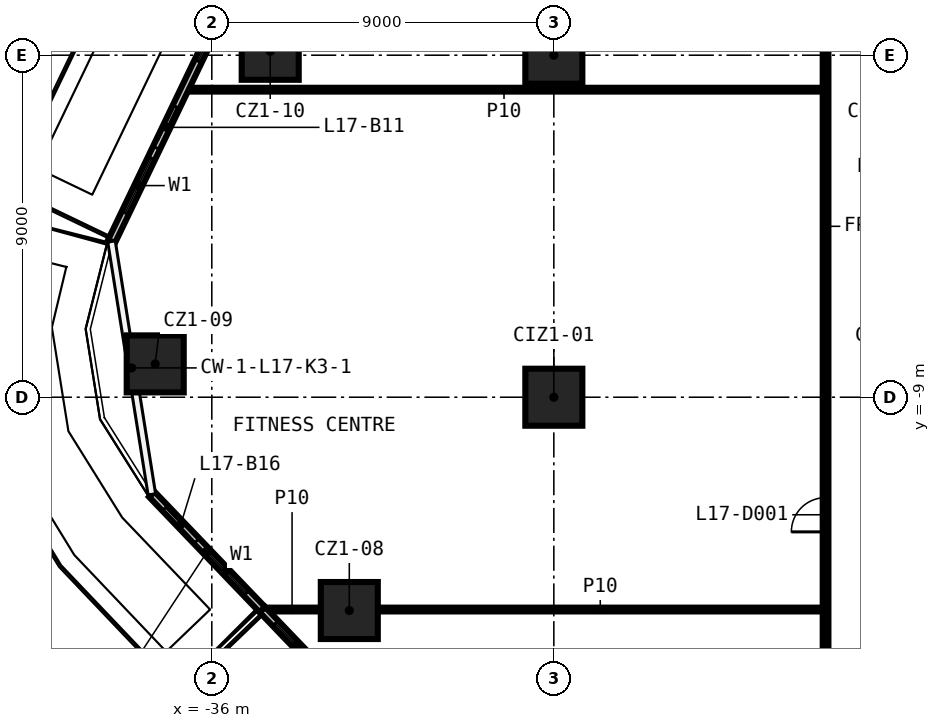
"""IFC4 building model, lengths in metres.
Left out: names, types, materials, properties, quantities, classifications, styles, units other than length and angle.
Written with IfcOpenShell. Run it as: python <this file> out.ifc"""

import sys

from ifc_helpers import new_model, si_unit, direction, frame, frame_2d, origin, origin_2d, place, context, subcontext, project, spatial, rectangle, extrude, element, fill, save


model = new_model("IFC4")
c1 = context("Model", 3, precision=1e-05, world=origin(), true_north=direction((0.0, 1.0)))
c2 = subcontext(c1, "Body", "Model", "MODEL_VIEW")
j1 = project(units=[si_unit("LENGTHUNIT", "METRE"), si_unit("PLANEANGLEUNIT", "RADIAN")], contexts=[c1])
p1 = place(None, origin())
s1 = spatial("IfcSite", under=j1, at=p1, CompositionType="ELEMENT")
p2 = place(p1, origin())
s2 = spatial("IfcBuilding", under=s1, at=p2, CompositionType="ELEMENT")
p3 = place(p2, frame((0.0, 0.0, 84.7)))
s3 = spatial("IfcBuildingStorey", under=s2, at=p3, CompositionType="ELEMENT", Elevation=84.7)
for number, where, z_axis, x_axis in (
    (1, (-32.382, -14.613, 0.0), (0.0, 0.0, 1.0), (1.0, 0.0, 0.0)),
    (2, (-37.489, -8.123, 0.0), (0.0, 0.0, 1.0), (1.0, 0.0, 0.0)),
    (3, (-34.463, 0.103, 0.0), (0.0, 0.0, 1.0), (1.0, 0.0, 0.0)),
    (4, (-27.0, -9.0, 0.0), (0.0, 0.0, 1.0), (1.0, 0.0, 0.0)),
    (5, (-27.0, 0.0, 0.0), (0.0, 0.0, 1.0), (1.0, 0.0, 0.0)),
):
    element("IfcColumn", number, at=place(p3, frame(where, z_axis=z_axis, x_axis=x_axis)), inside=s3, PredefinedType="COLUMN", context=c2, shape_type="SweptSolid", body=[
        extrude(rectangle(XDim=1.5, YDim=1.5, at=origin_2d()), origin(), (0.0, 0.0, 1.0), 3.9),
    ])
p4 = place(p3, frame((-34.644, -14.587, 0.0), z_axis=(0.0, 0.0, 1.0), x_axis=(1.0, 0.0, 0.0)))
e6 = element("IfcWall", 6, at=p4, inside=s3, PredefinedType="PARTITIONING", context=c2, shape_type="SweptSolid", body=[
    extrude(rectangle(XDim=1.512, YDim=0.1, at=frame_2d((0.756, 0.0))), origin(), (0.0, 0.0, 1.0), 3.9),
])
p5 = place(p3, frame((-31.632, -14.587, 0.0), z_axis=(0.0, 0.0, 1.0), x_axis=(1.0, 0.0, 0.0)))
e7 = element("IfcWall", 7, at=p5, inside=s3, PredefinedType="PARTITIONING", context=c2, shape_type="SweptSolid", body=[
    extrude(rectangle(XDim=11.707, YDim=0.1, at=frame_2d((5.854, 0.0))), origin(), (0.0, 0.0, 1.0), 3.9),
])
p6 = place(p3, frame((-36.698, -0.907, 0.0), z_axis=(0.0, 0.0, 1.0), x_axis=(1.0, 0.0, 0.0)))
e8 = element("IfcWall", 8, at=p6, inside=s3, PredefinedType="PARTITIONING", context=c2, shape_type="SweptSolid", body=[
    extrude(rectangle(XDim=16.772, YDim=0.1, at=frame_2d((8.386, 0.0))), origin(), (0.0, 0.0, 1.0), 3.9),
])
p7 = place(p3, frame((-19.85, -16.775, 0.0), z_axis=(0.0, 0.0, 1.0), x_axis=(0.0, 1.0, 0.0)))
e9 = element("IfcWall", 9, at=p7, inside=s3, PredefinedType="PARTITIONING", context=c2, shape_type="SweptSolid", body=[
    extrude(rectangle(XDim=33.55, YDim=0.15, at=frame_2d((16.775, 0.0))), origin(), (0.0, 0.0, 1.0), 3.9),
])
p8 = place(p7, frame((4.232, 0.0, 0.0)))
e10 = element("IfcOpeningElement", 10, at=p8, cuts=e9, PredefinedType="OPENING", context=c2, shape_type="SweptSolid", body=[
    extrude(rectangle(XDim=0.9, YDim=2.1, at=frame_2d((0.45, 1.05))), frame((0.0, 0.085, 0.0), z_axis=(0.0, -1.0, 0.0), x_axis=(1.0, 0.0, 0.0)), (0.0, 0.0, 1.0), 0.17),
])
p9 = place(p7, frame((19.413, 0.0, 0.0)))
e11 = element("IfcOpeningElement", 11, at=p9, cuts=e9, PredefinedType="OPENING", context=c2, shape_type="SweptSolid", body=[
    extrude(rectangle(XDim=0.9, YDim=2.1, at=frame_2d((0.45, 1.05))), frame((0.0, 0.085, 0.0), z_axis=(0.0, -1.0, 0.0), x_axis=(1.0, 0.0, 0.0)), (0.0, 0.0, 1.0), 0.17),
])
p10 = place(p3, frame((-25.203, 23.062, 0.0), z_axis=(0.0, 0.0, 1.0), x_axis=(-0.4330751292, -0.901357827097, 0.0)))
e12 = element("IfcWall", 12, at=p10, inside=s3, PredefinedType="SOLIDWALL", context=c2, shape_type="SweptSolid", body=[
    extrude(rectangle(XDim=31.024, YDim=0.2, at=frame_2d((15.512, 0.0))), origin(), (0.0, 0.0, 1.0), 3.9),
])
p11 = place(p10, frame((2.0, 0.0, 0.6)))
e13 = element("IfcOpeningElement", 13, at=p11, cuts=e12, PredefinedType="OPENING", context=c2, shape_type="SweptSolid", body=[
    extrude(rectangle(XDim=1.6, YDim=2.4, at=frame_2d((0.8, 1.2))), frame((0.0, 0.11, 0.0), z_axis=(0.0, -1.0, 0.0), x_axis=(1.0, 0.0, 0.0)), (0.0, 0.0, 1.0), 0.22),
])
p12 = place(p10, frame((0.5, 0.0, 0.0)))
e14 = element("IfcOpeningElement", 14, at=p12, cuts=e12, PredefinedType="OPENING", context=c2, shape_type="SweptSolid", body=[
    extrude(rectangle(XDim=1.2, YDim=2.4, at=frame_2d((0.6, 1.2))), frame((0.0, 0.11, 0.0), z_axis=(0.0, -1.0, 0.0), x_axis=(1.0, 0.0, 0.0)), (0.0, 0.0, 1.0), 0.22),
])
p13 = place(p10, frame((6.432, 0.0, 0.6)))
e15 = element("IfcOpeningElement", 15, at=p13, cuts=e12, PredefinedType="OPENING", context=c2, shape_type="SweptSolid", body=[
    extrude(rectangle(XDim=1.6, YDim=2.4, at=frame_2d((0.8, 1.2))), frame((0.0, 0.11, 0.0), z_axis=(0.0, -1.0, 0.0), x_axis=(1.0, 0.0, 0.0)), (0.0, 0.0, 1.0), 0.22),
])
p14 = place(p10, frame((4.932, 0.0, 0.0)))
e16 = element("IfcOpeningElement", 16, at=p14, cuts=e12, PredefinedType="OPENING", context=c2, shape_type="SweptSolid", body=[
    extrude(rectangle(XDim=1.2, YDim=2.4, at=frame_2d((0.6, 1.2))), frame((0.0, 0.11, 0.0), z_axis=(0.0, -1.0, 0.0), x_axis=(1.0, 0.0, 0.0)), (0.0, 0.0, 1.0), 0.22),
])
p15 = place(p10, frame((10.864, 0.0, 0.6)))
e17 = element("IfcOpeningElement", 17, at=p15, cuts=e12, PredefinedType="OPENING", context=c2, shape_type="SweptSolid", body=[
    extrude(rectangle(XDim=1.6, YDim=2.4, at=frame_2d((0.8, 1.2))), frame((0.0, 0.11, 0.0), z_axis=(0.0, -1.0, 0.0), x_axis=(1.0, 0.0, 0.0)), (0.0, 0.0, 1.0), 0.22),
])
p16 = place(p10, frame((9.364, 0.0, 0.0)))
e18 = element("IfcOpeningElement", 18, at=p16, cuts=e12, PredefinedType="OPENING", context=c2, shape_type="SweptSolid", body=[
    extrude(rectangle(XDim=1.2, YDim=2.4, at=frame_2d((0.6, 1.2))), frame((0.0, 0.11, 0.0), z_axis=(0.0, -1.0, 0.0), x_axis=(1.0, 0.0, 0.0)), (0.0, 0.0, 1.0), 0.22),
])
p17 = place(p10, frame((15.296, 0.0, 0.6)))
e19 = element("IfcOpeningElement", 19, at=p17, cuts=e12, PredefinedType="OPENING", context=c2, shape_type="SweptSolid", body=[
    extrude(rectangle(XDim=1.6, YDim=2.4, at=frame_2d((0.8, 1.2))), frame((0.0, 0.11, 0.0), z_axis=(0.0, -1.0, 0.0), x_axis=(1.0, 0.0, 0.0)), (0.0, 0.0, 1.0), 0.22),
])
p18 = place(p10, frame((13.796, 0.0, 0.0)))
e20 = element("IfcOpeningElement", 20, at=p18, cuts=e12, PredefinedType="OPENING", context=c2, shape_type="SweptSolid", body=[
    extrude(rectangle(XDim=1.2, YDim=2.4, at=frame_2d((0.6, 1.2))), frame((0.0, 0.11, 0.0), z_axis=(0.0, -1.0, 0.0), x_axis=(1.0, 0.0, 0.0)), (0.0, 0.0, 1.0), 0.22),
])
p19 = place(p10, frame((19.728, 0.0, 0.6)))
e21 = element("IfcOpeningElement", 21, at=p19, cuts=e12, PredefinedType="OPENING", context=c2, shape_type="SweptSolid", body=[
    extrude(rectangle(XDim=1.6, YDim=2.4, at=frame_2d((0.8, 1.2))), frame((0.0, 0.11, 0.0), z_axis=(0.0, -1.0, 0.0), x_axis=(1.0, 0.0, 0.0)), (0.0, 0.0, 1.0), 0.22),
])
p20 = place(p10, frame((18.228, 0.0, 0.0)))
e22 = element("IfcOpeningElement", 22, at=p20, cuts=e12, PredefinedType="OPENING", context=c2, shape_type="SweptSolid", body=[
    extrude(rectangle(XDim=1.2, YDim=2.4, at=frame_2d((0.6, 1.2))), frame((0.0, 0.11, 0.0), z_axis=(0.0, -1.0, 0.0), x_axis=(1.0, 0.0, 0.0)), (0.0, 0.0, 1.0), 0.22),
])
p21 = place(p10, frame((24.16, 0.0, 0.6)))
e23 = element("IfcOpeningElement", 23, at=p21, cuts=e12, PredefinedType="OPENING", context=c2, shape_type="SweptSolid", body=[
    extrude(rectangle(XDim=1.6, YDim=2.4, at=frame_2d((0.8, 1.2))), frame((0.0, 0.11, 0.0), z_axis=(0.0, -1.0, 0.0), x_axis=(1.0, 0.0, 0.0)), (0.0, 0.0, 1.0), 0.22),
])
p22 = place(p10, frame((22.66, 0.0, 0.0)))
e24 = element("IfcOpeningElement", 24, at=p22, cuts=e12, PredefinedType="OPENING", context=c2, shape_type="SweptSolid", body=[
    extrude(rectangle(XDim=1.2, YDim=2.4, at=frame_2d((0.6, 1.2))), frame((0.0, 0.11, 0.0), z_axis=(0.0, -1.0, 0.0), x_axis=(1.0, 0.0, 0.0)), (0.0, 0.0, 1.0), 0.22),
])
p23 = place(p10, frame((28.592, 0.0, 0.6)))
e25 = element("IfcOpeningElement", 25, at=p23, cuts=e12, PredefinedType="OPENING", context=c2, shape_type="SweptSolid", body=[
    extrude(rectangle(XDim=1.6, YDim=2.4, at=frame_2d((0.8, 1.2))), frame((0.0, 0.11, 0.0), z_axis=(0.0, -1.0, 0.0), x_axis=(1.0, 0.0, 0.0)), (0.0, 0.0, 1.0), 0.22),
])
p24 = place(p10, frame((27.092, 0.0, 0.0)))
e26 = element("IfcOpeningElement", 26, at=p24, cuts=e12, PredefinedType="OPENING", context=c2, shape_type="SweptSolid", body=[
    extrude(rectangle(XDim=1.2, YDim=2.4, at=frame_2d((0.6, 1.2))), frame((0.0, 0.11, 0.0), z_axis=(0.0, -1.0, 0.0), x_axis=(1.0, 0.0, 0.0)), (0.0, 0.0, 1.0), 0.22),
])
p25 = place(p3, frame((-34.672, -14.587, 0.0), z_axis=(0.0, 0.0, 1.0), x_axis=(0.691990084897, -0.721907003987, 0.0)))
e27 = element("IfcWall", 27, at=p25, inside=s3, PredefinedType="SOLIDWALL", context=c2, shape_type="SweptSolid", body=[
    extrude(rectangle(XDim=16.835, YDim=0.2, at=frame_2d((8.418, 0.0))), origin(), (0.0, 0.0, 1.0), 3.9),
])
p26 = place(p25, frame((0.5, 0.0, 0.6)))
e28 = element("IfcOpeningElement", 28, at=p26, cuts=e27, PredefinedType="OPENING", context=c2, shape_type="SweptSolid", body=[
    extrude(rectangle(XDim=1.6, YDim=2.4, at=frame_2d((0.8, 1.2))), frame((0.0, 0.11, 0.0), z_axis=(0.0, -1.0, 0.0), x_axis=(1.0, 0.0, 0.0)), (0.0, 0.0, 1.0), 0.22),
])
p27 = place(p25, frame((2.5, 0.0, 0.0)))
e29 = element("IfcOpeningElement", 29, at=p27, cuts=e27, PredefinedType="OPENING", context=c2, shape_type="SweptSolid", body=[
    extrude(rectangle(XDim=1.2, YDim=2.4, at=frame_2d((0.6, 1.2))), frame((0.0, 0.11, 0.0), z_axis=(0.0, -1.0, 0.0), x_axis=(1.0, 0.0, 0.0)), (0.0, 0.0, 1.0), 0.22),
])
p28 = place(p25, frame((6.209, 0.0, 0.6)))
e30 = element("IfcOpeningElement", 30, at=p28, cuts=e27, PredefinedType="OPENING", context=c2, shape_type="SweptSolid", body=[
    extrude(rectangle(XDim=1.6, YDim=2.4, at=frame_2d((0.8, 1.2))), frame((0.0, 0.11, 0.0), z_axis=(0.0, -1.0, 0.0), x_axis=(1.0, 0.0, 0.0)), (0.0, 0.0, 1.0), 0.22),
])
p29 = place(p25, frame((4.709, 0.0, 0.0)))
e31 = element("IfcOpeningElement", 31, at=p29, cuts=e27, PredefinedType="OPENING", context=c2, shape_type="SweptSolid", body=[
    extrude(rectangle(XDim=1.2, YDim=2.4, at=frame_2d((0.6, 1.2))), frame((0.0, 0.11, 0.0), z_axis=(0.0, -1.0, 0.0), x_axis=(1.0, 0.0, 0.0)), (0.0, 0.0, 1.0), 0.22),
])
p30 = place(p25, frame((8.918, 0.0, 0.6)))
e32 = element("IfcOpeningElement", 32, at=p30, cuts=e27, PredefinedType="OPENING", context=c2, shape_type="SweptSolid", body=[
    extrude(rectangle(XDim=1.6, YDim=2.4, at=frame_2d((0.8, 1.2))), frame((0.0, 0.11, 0.0), z_axis=(0.0, -1.0, 0.0), x_axis=(1.0, 0.0, 0.0)), (0.0, 0.0, 1.0), 0.22),
])
p31 = place(p25, frame((10.818, 0.0, 0.0)))
e33 = element("IfcOpeningElement", 33, at=p31, cuts=e27, PredefinedType="OPENING", context=c2, shape_type="SweptSolid", body=[
    extrude(rectangle(XDim=1.2, YDim=2.4, at=frame_2d((0.6, 1.2))), frame((0.0, 0.11, 0.0), z_axis=(0.0, -1.0, 0.0), x_axis=(1.0, 0.0, 0.0)), (0.0, 0.0, 1.0), 0.22),
])
p32 = place(p25, frame((14.626, 0.0, 0.6)))
e34 = element("IfcOpeningElement", 34, at=p32, cuts=e27, PredefinedType="OPENING", context=c2, shape_type="SweptSolid", body=[
    extrude(rectangle(XDim=1.6, YDim=2.4, at=frame_2d((0.8, 1.2))), frame((0.0, 0.11, 0.0), z_axis=(0.0, -1.0, 0.0), x_axis=(1.0, 0.0, 0.0)), (0.0, 0.0, 1.0), 0.22),
])
p33 = place(p25, frame((13.126, 0.0, 0.0)))
e35 = element("IfcOpeningElement", 35, at=p33, cuts=e27, PredefinedType="OPENING", context=c2, shape_type="SweptSolid", body=[
    extrude(rectangle(XDim=1.2, YDim=2.4, at=frame_2d((0.6, 1.2))), frame((0.0, 0.11, 0.0), z_axis=(0.0, -1.0, 0.0), x_axis=(1.0, 0.0, 0.0)), (0.0, 0.0, 1.0), 0.22),
])
p34 = place(p3, frame((-37.578, -11.556, 0.0), z_axis=(0.0, 0.0, 1.0), x_axis=(0.692005127075, -0.721892584878, 0.0)))
e36 = element("IfcWall", 36, at=p34, inside=s3, PredefinedType="SOLIDWALL", context=c2, shape_type="SweptSolid", body=[
    extrude(rectangle(XDim=4.199, YDim=0.2, at=frame_2d((2.099, 0.0))), origin(), (0.0, 0.0, 1.0), 3.9),
])
p35 = place(p34, frame((2.0, 0.0, 0.6)))
e37 = element("IfcOpeningElement", 37, at=p35, cuts=e36, PredefinedType="OPENING", context=c2, shape_type="SweptSolid", body=[
    extrude(rectangle(XDim=1.6, YDim=2.4, at=frame_2d((0.8, 1.2))), frame((0.0, 0.11, 0.0), z_axis=(0.0, -1.0, 0.0), x_axis=(1.0, 0.0, 0.0)), (0.0, 0.0, 1.0), 0.22),
])
p36 = place(p34, frame((0.5, 0.0, 0.0)))
e38 = element("IfcOpeningElement", 38, at=p36, cuts=e36, PredefinedType="OPENING", context=c2, shape_type="SweptSolid", body=[
    extrude(rectangle(XDim=1.2, YDim=2.4, at=frame_2d((0.6, 1.2))), frame((0.0, 0.11, 0.0), z_axis=(0.0, -1.0, 0.0), x_axis=(1.0, 0.0, 0.0)), (0.0, 0.0, 1.0), 0.22),
])
p37 = place(p8, origin())
e39 = element("IfcDoor", 39, at=p37, inside=s3, OperationType="SINGLE_SWING_RIGHT", PredefinedType="DOOR", context=c2, shape_type="SweptSolid", body=[
    extrude(rectangle(XDim=0.9, YDim=2.1, at=frame_2d((0.45, 1.05))), frame((0.0, 0.025, 0.0), z_axis=(0.0, -1.0, 0.0), x_axis=(1.0, 0.0, 0.0)), (0.0, 0.0, 1.0), 0.05),
])
fill(e10, e39)
p38 = place(p21, origin())
e40 = element("IfcWindow", 40, at=p38, inside=s3, PartitioningType="SINGLE_PANEL", PredefinedType="WINDOW", context=c2, shape_type="SweptSolid", body=[
    extrude(rectangle(XDim=1.6, YDim=2.4, at=frame_2d((0.8, 1.2))), frame((0.0, 0.03, 0.0), z_axis=(0.0, -1.0, 0.0), x_axis=(1.0, 0.0, 0.0)), (0.0, 0.0, 1.0), 0.06),
])
fill(e23, e40)
p39 = place(p23, origin())
e41 = element("IfcWindow", 41, at=p39, inside=s3, PartitioningType="SINGLE_PANEL", PredefinedType="WINDOW", context=c2, shape_type="SweptSolid", body=[
    extrude(rectangle(XDim=1.6, YDim=2.4, at=frame_2d((0.8, 1.2))), frame((0.0, 0.03, 0.0), z_axis=(0.0, -1.0, 0.0), x_axis=(1.0, 0.0, 0.0)), (0.0, 0.0, 1.0), 0.06),
])
fill(e25, e41)
p40 = place(p24, origin())
e42 = element("IfcDoor", 42, at=p40, inside=s3, OperationType="SLIDING_TO_LEFT", PredefinedType="DOOR", context=c2, shape_type="SweptSolid", body=[
    extrude(rectangle(XDim=1.2, YDim=2.4, at=frame_2d((0.6, 1.2))), frame((0.0, 0.025, 0.0), z_axis=(0.0, -1.0, 0.0), x_axis=(1.0, 0.0, 0.0)), (0.0, 0.0, 1.0), 0.05),
])
fill(e26, e42)
p41 = place(p26, origin())
e43 = element("IfcWindow", 43, at=p41, inside=s3, PartitioningType="SINGLE_PANEL", PredefinedType="WINDOW", context=c2, shape_type="SweptSolid", body=[
    extrude(rectangle(XDim=1.6, YDim=2.4, at=frame_2d((0.8, 1.2))), frame((0.0, 0.03, 0.0), z_axis=(0.0, -1.0, 0.0), x_axis=(1.0, 0.0, 0.0)), (0.0, 0.0, 1.0), 0.06),
])
fill(e28, e43)
p42 = place(p35, origin())
e44 = element("IfcWindow", 44, at=p42, inside=s3, PartitioningType="SINGLE_PANEL", PredefinedType="WINDOW", context=c2, shape_type="SweptSolid", body=[
    extrude(rectangle(XDim=1.6, YDim=2.4, at=frame_2d((0.8, 1.2))), frame((0.0, 0.03, 0.0), z_axis=(0.0, -1.0, 0.0), x_axis=(1.0, 0.0, 0.0)), (0.0, 0.0, 1.0), 0.06),
])
fill(e37, e44)
p43 = place(p36, origin())
e45 = element("IfcDoor", 45, at=p43, inside=s3, OperationType="SLIDING_TO_LEFT", PredefinedType="DOOR", context=c2, shape_type="SweptSolid", body=[
    extrude(rectangle(XDim=1.2, YDim=2.4, at=frame_2d((0.6, 1.2))), frame((0.0, 0.025, 0.0), z_axis=(0.0, -1.0, 0.0), x_axis=(1.0, 0.0, 0.0)), (0.0, 0.0, 1.0), 0.05),
])
fill(e38, e45)
save(model, sys.argv[1])
